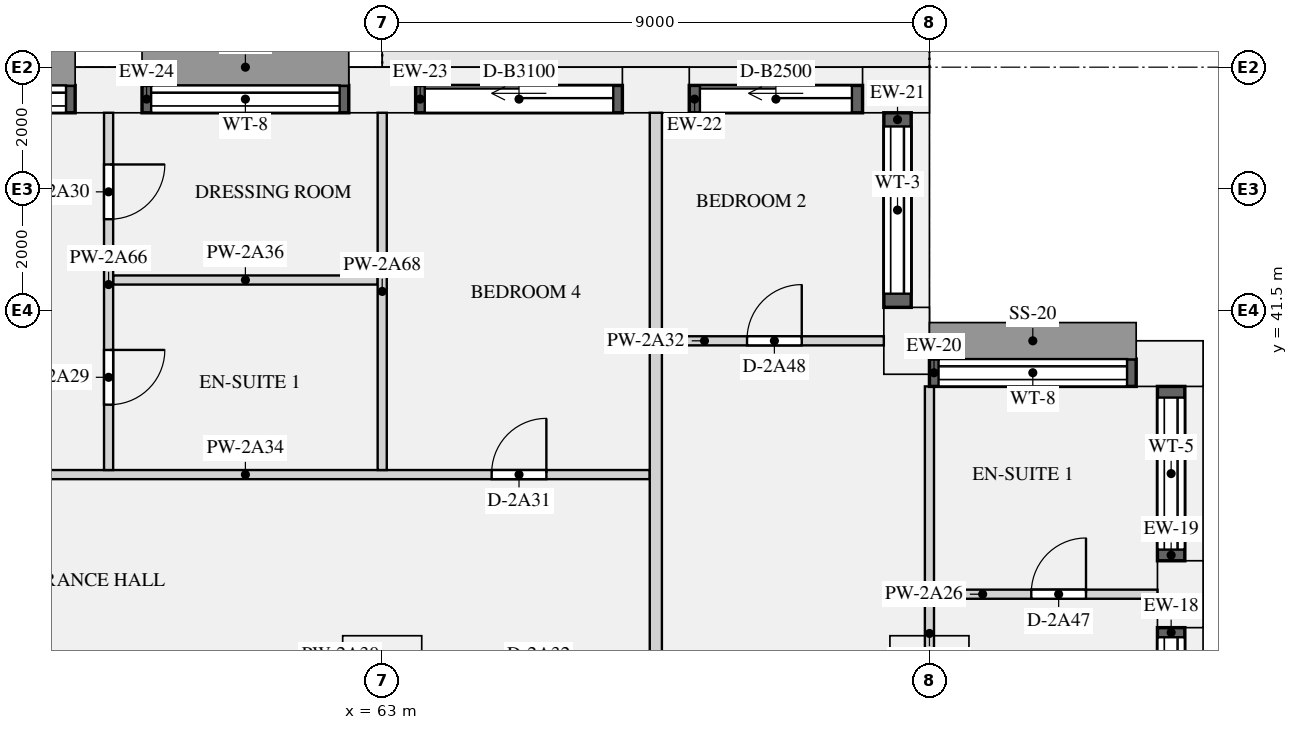
"""IFC4 building model, lengths in metres.
Left out: names, types, materials, properties, quantities, classifications, styles, units other than length and angle.
Written with IfcOpenShell. Run it as: python <this file> out.ifc"""

import sys

from ifc_helpers import new_model, si_unit, direction, frame, frame_2d, origin, origin_2d, place, context, subcontext, project, spatial, rectangle, extrude, element, fill, save


model = new_model("IFC4")
c1 = context("Model", 3, precision=1e-05, world=origin(), true_north=direction((0.0, 1.0)))
c2 = subcontext(c1, "Body", "Model", "MODEL_VIEW")
j1 = project(units=[si_unit("LENGTHUNIT", "METRE"), si_unit("PLANEANGLEUNIT", "RADIAN")], contexts=[c1])
p1 = place(None, origin())
s1 = spatial("IfcSite", under=j1, at=p1, CompositionType="ELEMENT")
p2 = place(p1, origin())
s2 = spatial("IfcBuilding", under=s1, at=p2, CompositionType="ELEMENT")
p3 = place(p2, frame((0.0, 0.0, 83.55)))
s3 = spatial("IfcBuildingStorey", under=s2, at=p3, CompositionType="ELEMENT", Elevation=83.55)
for number, where, z_axis, x_axis in (
    (1, (76.125, 36.833, 0.0), (0.0, 0.0, 1.0), (0.0, 1.0, 0.0)),
    (2, (75.95, 40.625, 0.0), (0.0, 0.0, 1.0), (-1.0, 0.0, 0.0)),
    (3, (71.625, 41.0, 0.0), (0.0, 0.0, 1.0), (0.0, 1.0, 0.0)),
    (4, (71.45, 45.125, 0.0), (0.0, 0.0, 1.0), (-1.0, 0.0, 0.0)),
    (5, (67.5, 45.125, 0.0), (0.0, 0.0, 1.0), (-1.0, 0.0, 0.0)),
    (6, (63.0, 45.125, 0.0), (0.0, 0.0, 1.0), (-1.0, 0.0, 0.0)),
    (7, (58.5, 45.125, 0.0), (0.0, 0.0, 1.0), (-1.0, 0.0, 0.0)),
):
    element("IfcColumn", number, at=place(p3, frame(where, z_axis=z_axis, x_axis=x_axis)), inside=s3, PredefinedType="USERDEFINED", context=c2, shape_type="SweptSolid", body=[
        extrude(rectangle(XDim=1.1, YDim=0.75, at=origin_2d()), origin(), (0.0, 0.0, 1.0), 3.15),
    ])
for number, where, z_axis, x_axis in (
    (8, (63.0, 35.5, 0.0), (0.0, 0.0, 1.0), (1.0, 0.0, 0.0)),
    (9, (72.0, 35.5, 0.0), (0.0, 0.0, 1.0), (1.0, 0.0, 0.0)),
):
    element("IfcColumn", number, at=place(p3, frame(where, z_axis=z_axis, x_axis=x_axis)), inside=s3, PredefinedType="COLUMN", context=c2, shape_type="SweptSolid", body=[
        extrude(rectangle(XDim=1.3, YDim=1.3, at=origin_2d()), origin(), (0.0, 0.0, 1.0), 3.15),
    ])
p4 = place(p3, frame((75.975, 33.217, 0.9), z_axis=(0.0, 0.0, 1.0), x_axis=(0.0, 1.0, 0.0)))
e10 = element("IfcWall", 10, at=p4, inside=s3, PredefinedType="SOLIDWALL", context=c2, shape_type="SweptSolid", body=[
    extrude(rectangle(XDim=3.066, YDim=0.45, at=frame_2d((1.533, 0.0))), origin(), (0.0, 0.0, 1.0), 1.93),
])
p5 = place(p4, frame((0.158, 0.0, 0.15)))
e11 = element("IfcOpeningElement", 11, at=p5, cuts=e10, PredefinedType="OPENING", context=c2, shape_type="SweptSolid", body=[
    extrude(rectangle(XDim=2.75, YDim=1.5, at=frame_2d((1.375, 0.75))), frame((0.0, 0.235, 0.0), z_axis=(0.0, -1.0, 0.0), x_axis=(1.0, 0.0, 0.0)), (0.0, 0.0, 1.0), 0.47),
])
p6 = place(p3, frame((75.975, 37.383, 0.9), z_axis=(0.0, 0.0, 1.0), x_axis=(0.0, 1.0, 0.0)))
e12 = element("IfcWall", 12, at=p6, inside=s3, PredefinedType="SOLIDWALL", context=c2, shape_type="SweptSolid", body=[
    extrude(rectangle(XDim=2.867, YDim=0.45, at=frame_2d((1.434, 0.0))), origin(), (0.0, 0.0, 1.0), 1.93),
])
p7 = place(p6, frame((0.184, 0.0, 0.15)))
e13 = element("IfcOpeningElement", 13, at=p7, cuts=e12, PredefinedType="OPENING", context=c2, shape_type="SweptSolid", body=[
    extrude(rectangle(XDim=2.5, YDim=1.5, at=frame_2d((1.25, 0.75))), frame((0.0, 0.235, 0.0), z_axis=(0.0, -1.0, 0.0), x_axis=(1.0, 0.0, 0.0)), (0.0, 0.0, 1.0), 0.47),
])
p8 = place(p3, frame((75.4, 40.475, 0.9), z_axis=(0.0, 0.0, 1.0), x_axis=(-1.0, 0.0, 0.0)))
e14 = element("IfcWall", 14, at=p8, inside=s3, PredefinedType="SOLIDWALL", context=c2, shape_type="SweptSolid", body=[
    extrude(rectangle(XDim=3.4, YDim=0.45, at=frame_2d((1.7, 0.0))), origin(), (0.0, 0.0, 1.0), 1.93),
])
p9 = place(p8, frame((0.15, 0.0, 0.15)))
e15 = element("IfcOpeningElement", 15, at=p9, cuts=e14, PredefinedType="OPENING", context=c2, shape_type="SweptSolid", body=[
    extrude(rectangle(XDim=3.1, YDim=1.5, at=frame_2d((1.55, 0.75))), frame((0.0, 0.235, 0.0), z_axis=(0.0, -1.0, 0.0), x_axis=(1.0, 0.0, 0.0)), (0.0, 0.0, 1.0), 0.47),
])
p10 = place(p3, frame((71.475, 41.55, 0.9), z_axis=(0.0, 0.0, 1.0), x_axis=(0.0, 1.0, 0.0)))
e16 = element("IfcWall", 16, at=p10, inside=s3, PredefinedType="SOLIDWALL", context=c2, shape_type="SweptSolid", body=[
    extrude(rectangle(XDim=3.2, YDim=0.45, at=frame_2d((1.6, 0.0))), origin(), (0.0, 0.0, 1.0), 1.93),
])
p11 = place(p10, frame((0.225, 0.0, 0.15)))
e17 = element("IfcOpeningElement", 17, at=p11, cuts=e16, PredefinedType="OPENING", context=c2, shape_type="SweptSolid", body=[
    extrude(rectangle(XDim=2.75, YDim=1.5, at=frame_2d((1.375, 0.75))), frame((0.0, 0.235, 0.0), z_axis=(0.0, -1.0, 0.0), x_axis=(1.0, 0.0, 0.0)), (0.0, 0.0, 1.0), 0.47),
])
p12 = place(p3, frame((70.9, 44.975, 0.0), z_axis=(0.0, 0.0, 1.0), x_axis=(-1.0, 0.0, 0.0)))
e18 = element("IfcWall", 18, at=p12, inside=s3, PredefinedType="SOLIDWALL", context=c2, shape_type="SweptSolid", body=[
    extrude(rectangle(XDim=2.85, YDim=0.45, at=frame_2d((1.425, 0.0))), origin(), (0.0, 0.0, 1.0), 2.83),
])
p13 = place(p12, frame((0.175, 0.0, 0.0)))
e19 = element("IfcOpeningElement", 19, at=p13, cuts=e18, PredefinedType="OPENING", context=c2, shape_type="SweptSolid", body=[
    extrude(rectangle(XDim=2.5, YDim=2.3, at=frame_2d((1.25, 1.15))), frame((0.0, 0.235, 0.0), z_axis=(0.0, -1.0, 0.0), x_axis=(1.0, 0.0, 0.0)), (0.0, 0.0, 1.0), 0.47),
])
p14 = place(p3, frame((66.95, 44.975, 0.0), z_axis=(0.0, 0.0, 1.0), x_axis=(-1.0, 0.0, 0.0)))
e20 = element("IfcWall", 20, at=p14, inside=s3, PredefinedType="SOLIDWALL", context=c2, shape_type="SweptSolid", body=[
    extrude(rectangle(XDim=3.4, YDim=0.45, at=frame_2d((1.7, 0.0))), origin(), (0.0, 0.0, 1.0), 2.83),
])
p15 = place(p14, frame((0.15, 0.0, 0.0)))
e21 = element("IfcOpeningElement", 21, at=p15, cuts=e20, PredefinedType="OPENING", context=c2, shape_type="SweptSolid", body=[
    extrude(rectangle(XDim=3.1, YDim=2.3, at=frame_2d((1.55, 1.15))), frame((0.0, 0.235, 0.0), z_axis=(0.0, -1.0, 0.0), x_axis=(1.0, 0.0, 0.0)), (0.0, 0.0, 1.0), 0.47),
])
p16 = place(p3, frame((62.45, 44.975, 0.9), z_axis=(0.0, 0.0, 1.0), x_axis=(-1.0, 0.0, 0.0)))
e22 = element("IfcWall", 22, at=p16, inside=s3, PredefinedType="SOLIDWALL", context=c2, shape_type="SweptSolid", body=[
    extrude(rectangle(XDim=3.4, YDim=0.45, at=frame_2d((1.7, 0.0))), origin(), (0.0, 0.0, 1.0), 1.93),
])
p17 = place(p16, frame((0.15, 0.0, 0.15)))
e23 = element("IfcOpeningElement", 23, at=p17, cuts=e22, PredefinedType="OPENING", context=c2, shape_type="SweptSolid", body=[
    extrude(rectangle(XDim=3.1, YDim=1.5, at=frame_2d((1.55, 0.75))), frame((0.0, 0.235, 0.0), z_axis=(0.0, -1.0, 0.0), x_axis=(1.0, 0.0, 0.0)), (0.0, 0.0, 1.0), 0.47),
])
p18 = place(p3, frame((57.95, 44.975, 0.9), z_axis=(0.0, 0.0, 1.0), x_axis=(-1.0, 0.0, 0.0)))
e24 = element("IfcWall", 24, at=p18, inside=s3, PredefinedType="SOLIDWALL", context=c2, shape_type="SweptSolid", body=[
    extrude(rectangle(XDim=3.4, YDim=0.45, at=frame_2d((1.7, 0.0))), origin(), (0.0, 0.0, 1.0), 1.93),
])
p19 = place(p18, frame((0.15, 0.0, 0.15)))
e25 = element("IfcOpeningElement", 25, at=p19, cuts=e24, PredefinedType="OPENING", context=c2, shape_type="SweptSolid", body=[
    extrude(rectangle(XDim=3.1, YDim=1.5, at=frame_2d((1.55, 0.75))), frame((0.0, 0.235, 0.0), z_axis=(0.0, -1.0, 0.0), x_axis=(1.0, 0.0, 0.0)), (0.0, 0.0, 1.0), 0.47),
])
p20 = place(p3, frame((72.075, 36.833, 0.0), z_axis=(0.0, 0.0, 1.0), x_axis=(1.0, 0.0, 0.0)))
e26 = element("IfcWall", 26, at=p20, inside=s3, PredefinedType="PARTITIONING", context=c2, shape_type="SweptSolid", body=[
    extrude(rectangle(XDim=3.675, YDim=0.15, at=frame_2d((1.837, 0.0))), origin(), (0.0, 0.0, 1.0), 2.83),
])
p21 = place(p20, frame((1.6, 0.0, 0.0)))
e27 = element("IfcOpeningElement", 27, at=p21, cuts=e26, PredefinedType="OPENING", context=c2, shape_type="SweptSolid", body=[
    extrude(rectangle(XDim=0.9, YDim=2.1, at=frame_2d((0.45, 1.05))), frame((0.0, 0.085, 0.0), z_axis=(0.0, -1.0, 0.0), x_axis=(1.0, 0.0, 0.0)), (0.0, 0.0, 1.0), 0.17),
])
p22 = place(p3, frame((67.6, 41.0, 0.0), z_axis=(0.0, 0.0, 1.0), x_axis=(1.0, 0.0, 0.0)))
e28 = element("IfcWall", 28, at=p22, inside=s3, PredefinedType="PARTITIONING", context=c2, shape_type="SweptSolid", body=[
    extrude(rectangle(XDim=3.65, YDim=0.15, at=frame_2d((1.825, 0.0))), origin(), (0.0, 0.0, 1.0), 2.83),
])
p23 = place(p22, frame((1.4, 0.0, 0.0)))
e29 = element("IfcOpeningElement", 29, at=p23, cuts=e28, PredefinedType="OPENING", context=c2, shape_type="SweptSolid", body=[
    extrude(rectangle(XDim=0.9, YDim=2.1, at=frame_2d((0.45, 1.05))), frame((0.0, 0.085, 0.0), z_axis=(0.0, -1.0, 0.0), x_axis=(1.0, 0.0, 0.0)), (0.0, 0.0, 1.0), 0.17),
])
p24 = place(p3, frame((47.925, 38.8, 0.0), z_axis=(0.0, 0.0, 1.0), x_axis=(1.0, 0.0, 0.0)))
e30 = element("IfcWall", 30, at=p24, inside=s3, PredefinedType="PARTITIONING", context=c2, shape_type="SweptSolid", body=[
    extrude(rectangle(XDim=19.475, YDim=0.15, at=frame_2d((9.737, 0.0))), origin(), (0.0, 0.0, 1.0), 2.83),
])
p25 = place(p24, frame((3.375, 0.0, 0.0)))
e31 = element("IfcOpeningElement", 31, at=p25, cuts=e30, PredefinedType="OPENING", context=c2, shape_type="SweptSolid", body=[
    extrude(rectangle(XDim=0.9, YDim=2.1, at=frame_2d((0.45, 1.05))), frame((0.0, 0.085, 0.0), z_axis=(0.0, -1.0, 0.0), x_axis=(1.0, 0.0, 0.0)), (0.0, 0.0, 1.0), 0.17),
])
p26 = place(p24, frame((7.875, 0.0, 0.0)))
e32 = element("IfcOpeningElement", 32, at=p26, cuts=e30, PredefinedType="OPENING", context=c2, shape_type="SweptSolid", body=[
    extrude(rectangle(XDim=0.9, YDim=2.1, at=frame_2d((0.45, 1.05))), frame((0.0, 0.085, 0.0), z_axis=(0.0, -1.0, 0.0), x_axis=(1.0, 0.0, 0.0)), (0.0, 0.0, 1.0), 0.17),
])
p27 = place(p24, frame((16.875, 0.0, 0.0)))
e33 = element("IfcOpeningElement", 33, at=p27, cuts=e30, PredefinedType="OPENING", context=c2, shape_type="SweptSolid", body=[
    extrude(rectangle(XDim=0.9, YDim=2.1, at=frame_2d((0.45, 1.05))), frame((0.0, 0.085, 0.0), z_axis=(0.0, -1.0, 0.0), x_axis=(1.0, 0.0, 0.0)), (0.0, 0.0, 1.0), 0.17),
])
p28 = place(p3, frame((58.575, 42.0, 0.0), z_axis=(0.0, 0.0, 1.0), x_axis=(1.0, 0.0, 0.0)))
e34 = element("IfcWall", 34, at=p28, inside=s3, PredefinedType="PARTITIONING", context=c2, shape_type="SweptSolid", body=[
    extrude(rectangle(XDim=4.35, YDim=0.15, at=frame_2d((2.175, 0.0))), origin(), (0.0, 0.0, 1.0), 2.83),
])
p29 = place(p3, frame((67.5, 24.575, 0.0), z_axis=(0.0, 0.0, 1.0), x_axis=(0.0, 1.0, 0.0)))
e35 = element("IfcWall", 35, at=p29, inside=s3, PredefinedType="PARTITIONING", context=c2, shape_type="SweptSolid", body=[
    extrude(rectangle(XDim=20.175, YDim=0.2, at=frame_2d((10.087, 0.0))), origin(), (0.0, 0.0, 1.0), 2.83),
])
p30 = place(p3, frame((58.5, 38.875, 0.0), z_axis=(0.0, 0.0, 1.0), x_axis=(0.0, 1.0, 0.0)))
e36 = element("IfcWall", 36, at=p30, inside=s3, PredefinedType="PARTITIONING", context=c2, shape_type="SweptSolid", body=[
    extrude(rectangle(XDim=5.875, YDim=0.15, at=frame_2d((2.938, 0.0))), origin(), (0.0, 0.0, 1.0), 2.83),
])
p31 = place(p30, frame((1.075, 0.0, 0.0)))
e37 = element("IfcOpeningElement", 37, at=p31, cuts=e36, PredefinedType="OPENING", context=c2, shape_type="SweptSolid", body=[
    extrude(rectangle(XDim=0.9, YDim=2.1, at=frame_2d((0.45, 1.05))), frame((0.0, 0.085, 0.0), z_axis=(0.0, -1.0, 0.0), x_axis=(1.0, 0.0, 0.0)), (0.0, 0.0, 1.0), 0.17),
])
p32 = place(p30, frame((4.125, 0.0, 0.0)))
e38 = element("IfcOpeningElement", 38, at=p32, cuts=e36, PredefinedType="OPENING", context=c2, shape_type="SweptSolid", body=[
    extrude(rectangle(XDim=0.9, YDim=2.1, at=frame_2d((0.45, 1.05))), frame((0.0, 0.085, 0.0), z_axis=(0.0, -1.0, 0.0), x_axis=(1.0, 0.0, 0.0)), (0.0, 0.0, 1.0), 0.17),
])
p33 = place(p3, frame((63.0, 38.875, 0.0), z_axis=(0.0, 0.0, 1.0), x_axis=(0.0, 1.0, 0.0)))
e39 = element("IfcWall", 39, at=p33, inside=s3, PredefinedType="PARTITIONING", context=c2, shape_type="SweptSolid", body=[
    extrude(rectangle(XDim=5.875, YDim=0.15, at=frame_2d((2.938, 0.0))), origin(), (0.0, 0.0, 1.0), 2.83),
])
p34 = place(p3, frame((72.0, 24.575, 0.0), z_axis=(0.0, 0.0, 1.0), x_axis=(0.0, 1.0, 0.0)))
e40 = element("IfcWall", 40, at=p34, inside=s3, PredefinedType="PARTITIONING", context=c2, shape_type="SweptSolid", body=[
    extrude(rectangle(XDim=15.675, YDim=0.15, at=frame_2d((7.837, 0.0))), origin(), (0.0, 0.0, 1.0), 2.83),
])
p35 = place(p34, frame((6.65, 0.0, 0.0)))
e41 = element("IfcOpeningElement", 41, at=p35, cuts=e40, PredefinedType="OPENING", context=c2, shape_type="SweptSolid", body=[
    extrude(rectangle(XDim=0.9, YDim=2.1, at=frame_2d((0.45, 1.05))), frame((0.0, 0.085, 0.0), z_axis=(0.0, -1.0, 0.0), x_axis=(1.0, 0.0, 0.0)), (0.0, 0.0, 1.0), 0.17),
])
p36 = place(p5, origin())
e42 = element("IfcWindow", 42, at=p36, inside=s3, PartitioningType="SINGLE_PANEL", PredefinedType="WINDOW", context=c2, shape_type="SweptSolid", body=[
    extrude(rectangle(XDim=2.75, YDim=1.5, at=frame_2d((1.375, 0.75))), frame((0.0, -0.065, 0.0), z_axis=(0.0, -1.0, 0.0), x_axis=(1.0, 0.0, 0.0)), (0.0, 0.0, 1.0), 0.06),
])
fill(e11, e42)
p37 = place(p7, origin())
e43 = element("IfcWindow", 43, at=p37, inside=s3, PartitioningType="SINGLE_PANEL", PredefinedType="WINDOW", context=c2, shape_type="SweptSolid", body=[
    extrude(rectangle(XDim=2.5, YDim=1.5, at=frame_2d((1.25, 0.75))), frame((0.0, -0.065, 0.0), z_axis=(0.0, -1.0, 0.0), x_axis=(1.0, 0.0, 0.0)), (0.0, 0.0, 1.0), 0.06),
])
fill(e13, e43)
p38 = place(p9, origin())
e44 = element("IfcWindow", 44, at=p38, inside=s3, PartitioningType="SINGLE_PANEL", PredefinedType="WINDOW", context=c2, shape_type="SweptSolid", body=[
    extrude(rectangle(XDim=3.1, YDim=1.5, at=frame_2d((1.55, 0.75))), frame((0.0, -0.065, 0.0), z_axis=(0.0, -1.0, 0.0), x_axis=(1.0, 0.0, 0.0)), (0.0, 0.0, 1.0), 0.06),
])
fill(e15, e44)
p39 = place(p11, origin())
e45 = element("IfcWindow", 45, at=p39, inside=s3, PartitioningType="SINGLE_PANEL", PredefinedType="WINDOW", context=c2, shape_type="SweptSolid", body=[
    extrude(rectangle(XDim=2.75, YDim=1.5, at=frame_2d((1.375, 0.75))), frame((0.0, -0.065, 0.0), z_axis=(0.0, -1.0, 0.0), x_axis=(1.0, 0.0, 0.0)), (0.0, 0.0, 1.0), 0.06),
])
fill(e17, e45)
p40 = place(p13, origin())
e46 = element("IfcDoor", 46, at=p40, inside=s3, OperationType="SLIDING_TO_LEFT", PredefinedType="DOOR", context=c2, shape_type="SweptSolid", body=[
    extrude(rectangle(XDim=2.5, YDim=2.3, at=frame_2d((1.25, 1.15))), frame((0.0, -0.07, 0.0), z_axis=(0.0, -1.0, 0.0), x_axis=(1.0, 0.0, 0.0)), (0.0, 0.0, 1.0), 0.05),
])
fill(e19, e46)
p41 = place(p15, origin())
e47 = element("IfcDoor", 47, at=p41, inside=s3, OperationType="SLIDING_TO_LEFT", PredefinedType="DOOR", context=c2, shape_type="SweptSolid", body=[
    extrude(rectangle(XDim=3.1, YDim=2.3, at=frame_2d((1.55, 1.15))), frame((0.0, -0.07, 0.0), z_axis=(0.0, -1.0, 0.0), x_axis=(1.0, 0.0, 0.0)), (0.0, 0.0, 1.0), 0.05),
])
fill(e21, e47)
p42 = place(p17, origin())
e48 = element("IfcWindow", 48, at=p42, inside=s3, PartitioningType="SINGLE_PANEL", PredefinedType="WINDOW", context=c2, shape_type="SweptSolid", body=[
    extrude(rectangle(XDim=3.1, YDim=1.5, at=frame_2d((1.55, 0.75))), frame((0.0, -0.065, 0.0), z_axis=(0.0, -1.0, 0.0), x_axis=(1.0, 0.0, 0.0)), (0.0, 0.0, 1.0), 0.06),
])
fill(e23, e48)
p43 = place(p19, origin())
e49 = element("IfcWindow", 49, at=p43, inside=s3, PartitioningType="SINGLE_PANEL", PredefinedType="WINDOW", context=c2, shape_type="SweptSolid", body=[
    extrude(rectangle(XDim=3.1, YDim=1.5, at=frame_2d((1.55, 0.75))), frame((0.0, -0.065, 0.0), z_axis=(0.0, -1.0, 0.0), x_axis=(1.0, 0.0, 0.0)), (0.0, 0.0, 1.0), 0.06),
])
fill(e25, e49)
p44 = place(p31, frame((0.9, 0.0, 0.0), z_axis=(0.0, 0.0, 1.0), x_axis=(-1.0, 0.0, 0.0)))
e50 = element("IfcDoor", 50, at=p44, inside=s3, OperationType="SINGLE_SWING_LEFT", PredefinedType="DOOR", context=c2, shape_type="SweptSolid", body=[
    extrude(rectangle(XDim=0.9, YDim=2.1, at=frame_2d((0.45, 1.05))), frame((0.0, 0.025, 0.0), z_axis=(0.0, -1.0, 0.0), x_axis=(1.0, 0.0, 0.0)), (0.0, 0.0, 1.0), 0.05),
])
fill(e37, e50)
p45 = place(p32, frame((0.9, 0.0, 0.0), z_axis=(0.0, 0.0, 1.0), x_axis=(-1.0, 0.0, 0.0)))
e51 = element("IfcDoor", 51, at=p45, inside=s3, OperationType="SINGLE_SWING_LEFT", PredefinedType="DOOR", context=c2, shape_type="SweptSolid", body=[
    extrude(rectangle(XDim=0.9, YDim=2.1, at=frame_2d((0.45, 1.05))), frame((0.0, 0.025, 0.0), z_axis=(0.0, -1.0, 0.0), x_axis=(1.0, 0.0, 0.0)), (0.0, 0.0, 1.0), 0.05),
])
fill(e38, e51)
p46 = place(p27, origin())
e52 = element("IfcDoor", 52, at=p46, inside=s3, OperationType="SINGLE_SWING_RIGHT", PredefinedType="DOOR", context=c2, shape_type="SweptSolid", body=[
    extrude(rectangle(XDim=0.9, YDim=2.1, at=frame_2d((0.45, 1.05))), frame((0.0, 0.025, 0.0), z_axis=(0.0, -1.0, 0.0), x_axis=(1.0, 0.0, 0.0)), (0.0, 0.0, 1.0), 0.05),
])
fill(e33, e52)
p47 = place(p21, origin())
e53 = element("IfcDoor", 53, at=p47, inside=s3, OperationType="SINGLE_SWING_RIGHT", PredefinedType="DOOR", context=c2, shape_type="SweptSolid", body=[
    extrude(rectangle(XDim=0.9, YDim=2.1, at=frame_2d((0.45, 1.05))), frame((0.0, 0.025, 0.0), z_axis=(0.0, -1.0, 0.0), x_axis=(1.0, 0.0, 0.0)), (0.0, 0.0, 1.0), 0.05),
])
fill(e27, e53)
p48 = place(p23, origin())
e54 = element("IfcDoor", 54, at=p48, inside=s3, OperationType="SINGLE_SWING_RIGHT", PredefinedType="DOOR", context=c2, shape_type="SweptSolid", body=[
    extrude(rectangle(XDim=0.9, YDim=2.1, at=frame_2d((0.45, 1.05))), frame((0.0, 0.025, 0.0), z_axis=(0.0, -1.0, 0.0), x_axis=(1.0, 0.0, 0.0)), (0.0, 0.0, 1.0), 0.05),
])
fill(e29, e54)
save(model, sys.argv[1])
